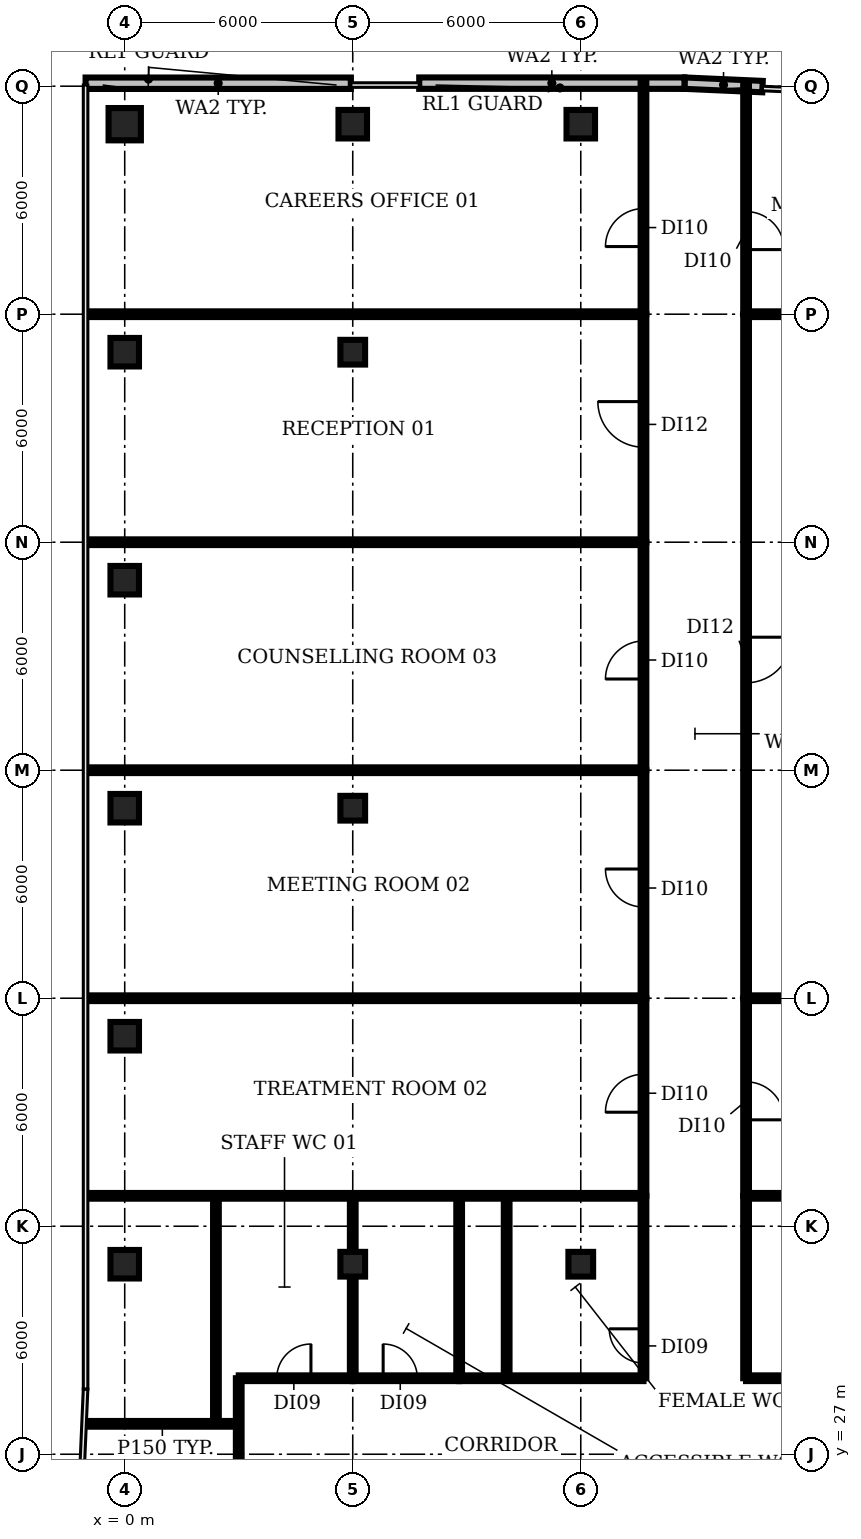
"""IFC4 building model, lengths in metres.
Left out: names, types, materials, properties, quantities, classifications, styles, units other than length and angle.
Written with IfcOpenShell. Run it as: python <this file> out.ifc"""

import sys

from ifc_helpers import new_model, si_unit, direction, frame, frame_2d, origin, origin_2d, place, context, subcontext, project, spatial, rectangle, circle, extrude, element, fill, save


model = new_model("IFC4")
c1 = context("Model", 3, precision=1e-05, world=origin(), true_north=direction((0.0, 1.0)))
c2 = subcontext(c1, "Body", "Model", "MODEL_VIEW")
j1 = project(units=[si_unit("LENGTHUNIT", "METRE"), si_unit("PLANEANGLEUNIT", "RADIAN")], contexts=[c1])
p1 = place(None, origin())
s1 = spatial("IfcSite", under=j1, at=p1, CompositionType="ELEMENT")
p2 = place(p1, origin())
s2 = spatial("IfcBuilding", under=s1, at=p2, CompositionType="ELEMENT")
p3 = place(p2, frame((0.0, 0.0, 276.8)))
s3 = spatial("IfcBuildingStorey", under=s2, at=p3, CompositionType="ELEMENT", Elevation=276.8)
for number, where, z_axis, x_axis in (
    (1, (0.0, 32.0, 0.0), (0.0, 0.0, 1.0), (1.0, 0.0, 0.0)),
    (2, (0.0, 38.0, 0.0), (0.0, 0.0, 1.0), (1.0, 0.0, 0.0)),
    (3, (0.0, 44.0, 0.0), (0.0, 0.0, 1.0), (1.0, 0.0, 0.0)),
    (4, (0.0, 50.0, 0.0), (0.0, 0.0, 1.0), (1.0, 0.0, 0.0)),
    (5, (0.0, 56.0, 0.0), (0.0, 0.0, 1.0), (1.0, 0.0, 0.0)),
):
    element("IfcColumn", number, at=place(p3, frame(where, z_axis=z_axis, x_axis=x_axis)), inside=s3, PredefinedType="COLUMN", context=c2, shape_type="SweptSolid", body=[
        extrude(rectangle(XDim=0.75, YDim=0.75, at=origin_2d()), origin(), (0.0, 0.0, 1.0), 3.85),
    ])
p4 = place(p3, frame((0.0, 62.0, 0.0), z_axis=(0.0, 0.0, 1.0), x_axis=(1.0, 0.0, 0.0)))
e6 = element("IfcColumn", 6, at=p4, inside=s3, PredefinedType="COLUMN", context=c2, shape_type="SweptSolid", body=[
    extrude(circle(Radius=0.425, at=origin_2d()), origin(), (0.0, 0.0, 1.0), 3.85),
])
for number, where, z_axis, x_axis in (
    (7, (6.0, 32.0, 0.0), (0.0, 0.0, 1.0), (1.0, 0.0, 0.0)),
    (8, (6.0, 44.0, 0.0), (0.0, 0.0, 1.0), (1.0, 0.0, 0.0)),
    (9, (6.0, 56.0, 0.0), (0.0, 0.0, 1.0), (1.0, 0.0, 0.0)),
):
    element("IfcColumn", number, at=place(p3, frame(where, z_axis=z_axis, x_axis=x_axis)), inside=s3, PredefinedType="COLUMN", context=c2, shape_type="SweptSolid", body=[
        extrude(rectangle(XDim=0.65, YDim=0.65, at=origin_2d()), origin(), (0.0, 0.0, 1.0), 3.85),
    ])
p5 = place(p3, frame((6.0, 62.0, 0.0), z_axis=(0.0, 0.0, 1.0), x_axis=(1.0, 0.0, 0.0)))
e10 = element("IfcColumn", 10, at=p5, inside=s3, PredefinedType="COLUMN", context=c2, shape_type="SweptSolid", body=[
    extrude(rectangle(XDim=0.75, YDim=0.75, at=origin_2d()), origin(), (0.0, 0.0, 1.0), 3.85),
])
p6 = place(p3, frame((12.0, 32.0, 0.0), z_axis=(0.0, 0.0, 1.0), x_axis=(1.0, 0.0, 0.0)))
e11 = element("IfcColumn", 11, at=p6, inside=s3, PredefinedType="COLUMN", context=c2, shape_type="SweptSolid", body=[
    extrude(rectangle(XDim=0.65, YDim=0.65, at=origin_2d()), origin(), (0.0, 0.0, 1.0), 3.85),
])
p7 = place(p3, frame((12.0, 62.0, 0.0), z_axis=(0.0, 0.0, 1.0), x_axis=(1.0, 0.0, 0.0)))
e12 = element("IfcColumn", 12, at=p7, inside=s3, PredefinedType="COLUMN", context=c2, shape_type="SweptSolid", body=[
    extrude(rectangle(XDim=0.75, YDim=0.75, at=origin_2d()), origin(), (0.0, 0.0, 1.0), 3.85),
])
p8 = place(p3, frame((16.782, 62.989, 0.0), z_axis=(0.0, 0.0, 1.0), x_axis=(-0.999021060555, 0.044237094932, 0.0)))
e13 = element("IfcWall", 13, at=p8, inside=s3, PredefinedType="SOLIDWALL", context=c2, shape_type="SweptSolid", body=[
    extrude(rectangle(XDim=2.053, YDim=0.3, at=frame_2d((1.026, 0.0))), origin(), (0.0, 0.0, 1.0), 3.85),
])
for number, where, z_axis, x_axis in (
    (14, (14.729, 63.08, 0.0), (0.0, 0.0, 1.0), (-1.0, 0.0, 0.0)),
    (15, (5.949, 63.078, 0.0), (0.0, 0.0, 1.0), (-1.0, 0.0, 0.0)),
):
    element("IfcWall", number, at=place(p3, frame(where, z_axis=z_axis, x_axis=x_axis)), inside=s3, PredefinedType="SOLIDWALL", context=c2, shape_type="SweptSolid", body=[
        extrude(rectangle(XDim=6.979, YDim=0.3, at=frame_2d((3.49, 0.0))), origin(), (0.0, 0.0, 1.0), 3.85),
    ])
p9 = place(p3, frame((-1.02, 27.8, 0.0), z_axis=(0.0, 0.0, 1.0), x_axis=(1.0, 0.0, 0.0)))
e16 = element("IfcWall", 16, at=p9, inside=s3, PredefinedType="PARTITIONING", context=c2, shape_type="SweptSolid", body=[
    extrude(rectangle(XDim=4.02, YDim=0.15, at=frame_2d((2.01, 0.0))), origin(), (0.0, 0.0, 1.0), 2.9),
])
for number, where, z_axis, x_axis in (
    (17, (-0.98, 33.8, 0.0), (0.0, 0.0, 1.0), (1.0, 0.0, 0.0)),
    (18, (-0.98, 39.0, 0.0), (0.0, 0.0, 1.0), (1.0, 0.0, 0.0)),
    (19, (-0.98, 45.0, 0.0), (0.0, 0.0, 1.0), (1.0, 0.0, 0.0)),
    (20, (-0.98, 51.0, 0.0), (0.0, 0.0, 1.0), (1.0, 0.0, 0.0)),
    (21, (-0.98, 57.0, 0.0), (0.0, 0.0, 1.0), (1.0, 0.0, 0.0)),
):
    element("IfcWall", number, at=place(p3, frame(where, z_axis=z_axis, x_axis=x_axis)), inside=s3, PredefinedType="PARTITIONING", context=c2, shape_type="SweptSolid", body=[
        extrude(rectangle(XDim=14.63, YDim=0.15, at=frame_2d((7.315, 0.0))), origin(), (0.0, 0.0, 1.0), 2.9),
    ])
p10 = place(p3, frame((2.4, 27.8, 0.0), z_axis=(0.0, 0.0, 1.0), x_axis=(0.0, 1.0, 0.0)))
e22 = element("IfcWall", 22, at=p10, inside=s3, PredefinedType="PARTITIONING", context=c2, shape_type="SweptSolid", body=[
    extrude(rectangle(XDim=6.0, YDim=0.15, at=frame_2d((3.0, 0.0))), origin(), (0.0, 0.0, 1.0), 2.9),
])
p11 = place(p3, frame((3.0, 25.1, 0.0), z_axis=(0.0, 0.0, 1.0), x_axis=(0.0, 1.0, 0.0)))
e23 = element("IfcWall", 23, at=p11, inside=s3, PredefinedType="PARTITIONING", context=c2, shape_type="SweptSolid", body=[
    extrude(rectangle(XDim=3.9, YDim=0.15, at=frame_2d((1.95, 0.0))), origin(), (0.0, 0.0, 1.0), 2.9),
])
p12 = place(p3, frame((3.0, 29.0, 0.0), z_axis=(0.0, 0.0, 1.0), x_axis=(1.0, 0.0, 0.0)))
e24 = element("IfcWall", 24, at=p12, inside=s3, PredefinedType="PARTITIONING", context=c2, shape_type="SweptSolid", body=[
    extrude(rectangle(XDim=3.0, YDim=0.15, at=frame_2d((1.5, 0.0))), origin(), (0.0, 0.0, 1.0), 2.9),
])
p13 = place(p12, frame((1.0, 0.0, 0.0)))
e25 = element("IfcOpeningElement", 25, at=p13, cuts=e24, PredefinedType="OPENING", context=c2, shape_type="SweptSolid", body=[
    extrude(rectangle(XDim=0.9, YDim=2.1, at=frame_2d((0.45, 1.05))), frame((0.0, 0.085, 0.0), z_axis=(0.0, -1.0, 0.0), x_axis=(1.0, 0.0, 0.0)), (0.0, 0.0, 1.0), 0.17),
])
p14 = place(p3, frame((6.0, 29.0, 0.0), z_axis=(0.0, 0.0, 1.0), x_axis=(0.0, 1.0, 0.0)))
e26 = element("IfcWall", 26, at=p14, inside=s3, PredefinedType="PARTITIONING", context=c2, shape_type="SweptSolid", body=[
    extrude(rectangle(XDim=4.8, YDim=0.15, at=frame_2d((2.4, 0.0))), origin(), (0.0, 0.0, 1.0), 2.9),
])
p15 = place(p3, frame((6.0, 29.0, 0.0), z_axis=(0.0, 0.0, 1.0), x_axis=(1.0, 0.0, 0.0)))
e27 = element("IfcWall", 27, at=p15, inside=s3, PredefinedType="PARTITIONING", context=c2, shape_type="SweptSolid", body=[
    extrude(rectangle(XDim=2.8, YDim=0.15, at=frame_2d((1.4, 0.0))), origin(), (0.0, 0.0, 1.0), 2.9),
])
p16 = place(p15, frame((0.8, 0.0, 0.0)))
e28 = element("IfcOpeningElement", 28, at=p16, cuts=e27, PredefinedType="OPENING", context=c2, shape_type="SweptSolid", body=[
    extrude(rectangle(XDim=0.9, YDim=2.1, at=frame_2d((0.45, 1.05))), frame((0.0, 0.085, 0.0), z_axis=(0.0, -1.0, 0.0), x_axis=(1.0, 0.0, 0.0)), (0.0, 0.0, 1.0), 0.17),
])
p17 = place(p3, frame((8.8, 29.0, 0.0), z_axis=(0.0, 0.0, 1.0), x_axis=(0.0, 1.0, 0.0)))
e29 = element("IfcWall", 29, at=p17, inside=s3, PredefinedType="PARTITIONING", context=c2, shape_type="SweptSolid", body=[
    extrude(rectangle(XDim=4.8, YDim=0.15, at=frame_2d((2.4, 0.0))), origin(), (0.0, 0.0, 1.0), 2.9),
])
p18 = place(p3, frame((8.8, 29.0, 0.0), z_axis=(0.0, 0.0, 1.0), x_axis=(1.0, 0.0, 0.0)))
e30 = element("IfcWall", 30, at=p18, inside=s3, PredefinedType="PARTITIONING", context=c2, shape_type="SweptSolid", body=[
    extrude(rectangle(XDim=4.85, YDim=0.15, at=frame_2d((2.425, 0.0))), origin(), (0.0, 0.0, 1.0), 2.9),
])
p19 = place(p3, frame((10.05, 29.0, 0.0), z_axis=(0.0, 0.0, 1.0), x_axis=(0.0, 1.0, 0.0)))
e31 = element("IfcWall", 31, at=p19, inside=s3, PredefinedType="PARTITIONING", context=c2, shape_type="SweptSolid", body=[
    extrude(rectangle(XDim=4.8, YDim=0.15, at=frame_2d((2.4, 0.0))), origin(), (0.0, 0.0, 1.0), 2.9),
])
p20 = place(p3, frame((13.65, 29.0, 0.0), z_axis=(0.0, 0.0, 1.0), x_axis=(0.0, 1.0, 0.0)))
e32 = element("IfcWall", 32, at=p20, inside=s3, PredefinedType="PARTITIONING", context=c2, shape_type="SweptSolid", body=[
    extrude(rectangle(XDim=4.8, YDim=0.15, at=frame_2d((2.4, 0.0))), origin(), (0.0, 0.0, 1.0), 2.9),
])
p21 = place(p20, frame((0.4, 0.0, 0.0)))
e33 = element("IfcOpeningElement", 33, at=p21, cuts=e32, PredefinedType="OPENING", context=c2, shape_type="SweptSolid", body=[
    extrude(rectangle(XDim=0.9, YDim=2.1, at=frame_2d((0.45, 1.05))), frame((0.0, 0.085, 0.0), z_axis=(0.0, -1.0, 0.0), x_axis=(1.0, 0.0, 0.0)), (0.0, 0.0, 1.0), 0.17),
])
p22 = place(p3, frame((13.65, 33.8, 0.0), z_axis=(0.0, 0.0, 1.0), x_axis=(0.0, 1.0, 0.0)))
e34 = element("IfcWall", 34, at=p22, inside=s3, PredefinedType="PARTITIONING", context=c2, shape_type="SweptSolid", body=[
    extrude(rectangle(XDim=5.2, YDim=0.15, at=frame_2d((2.6, 0.0))), origin(), (0.0, 0.0, 1.0), 2.9),
])
p23 = place(p22, frame((2.2, 0.0, 0.0)))
e35 = element("IfcOpeningElement", 35, at=p23, cuts=e34, PredefinedType="OPENING", context=c2, shape_type="SweptSolid", body=[
    extrude(rectangle(XDim=1.0, YDim=2.1, at=frame_2d((0.5, 1.05))), frame((0.0, 0.085, 0.0), z_axis=(0.0, -1.0, 0.0), x_axis=(1.0, 0.0, 0.0)), (0.0, 0.0, 1.0), 0.17),
])
p24 = place(p3, frame((13.65, 39.0, 0.0), z_axis=(0.0, 0.0, 1.0), x_axis=(0.0, 1.0, 0.0)))
e36 = element("IfcWall", 36, at=p24, inside=s3, PredefinedType="PARTITIONING", context=c2, shape_type="SweptSolid", body=[
    extrude(rectangle(XDim=6.0, YDim=0.15, at=frame_2d((3.0, 0.0))), origin(), (0.0, 0.0, 1.0), 2.9),
])
p25 = place(p24, frame((2.4, 0.0, 0.0)))
e37 = element("IfcOpeningElement", 37, at=p25, cuts=e36, PredefinedType="OPENING", context=c2, shape_type="SweptSolid", body=[
    extrude(rectangle(XDim=1.0, YDim=2.1, at=frame_2d((0.5, 1.05))), frame((0.0, 0.085, 0.0), z_axis=(0.0, -1.0, 0.0), x_axis=(1.0, 0.0, 0.0)), (0.0, 0.0, 1.0), 0.17),
])
p26 = place(p3, frame((13.65, 45.0, 0.0), z_axis=(0.0, 0.0, 1.0), x_axis=(0.0, 1.0, 0.0)))
e38 = element("IfcWall", 38, at=p26, inside=s3, PredefinedType="PARTITIONING", context=c2, shape_type="SweptSolid", body=[
    extrude(rectangle(XDim=6.0, YDim=0.15, at=frame_2d((3.0, 0.0))), origin(), (0.0, 0.0, 1.0), 2.9),
])
p27 = place(p26, frame((2.4, 0.0, 0.0)))
e39 = element("IfcOpeningElement", 39, at=p27, cuts=e38, PredefinedType="OPENING", context=c2, shape_type="SweptSolid", body=[
    extrude(rectangle(XDim=1.0, YDim=2.1, at=frame_2d((0.5, 1.05))), frame((0.0, 0.085, 0.0), z_axis=(0.0, -1.0, 0.0), x_axis=(1.0, 0.0, 0.0)), (0.0, 0.0, 1.0), 0.17),
])
p28 = place(p3, frame((13.65, 51.0, 0.0), z_axis=(0.0, 0.0, 1.0), x_axis=(0.0, 1.0, 0.0)))
e40 = element("IfcWall", 40, at=p28, inside=s3, PredefinedType="PARTITIONING", context=c2, shape_type="SweptSolid", body=[
    extrude(rectangle(XDim=6.0, YDim=0.15, at=frame_2d((3.0, 0.0))), origin(), (0.0, 0.0, 1.0), 2.9),
])
p29 = place(p28, frame((2.5, 0.0, 0.0)))
e41 = element("IfcOpeningElement", 41, at=p29, cuts=e40, PredefinedType="OPENING", context=c2, shape_type="SweptSolid", body=[
    extrude(rectangle(XDim=1.2, YDim=2.1, at=frame_2d((0.6, 1.05))), frame((0.0, 0.085, 0.0), z_axis=(0.0, -1.0, 0.0), x_axis=(1.0, 0.0, 0.0)), (0.0, 0.0, 1.0), 0.17),
])
p30 = place(p3, frame((13.65, 57.0, 0.0), z_axis=(0.0, 0.0, 1.0), x_axis=(0.0, 1.0, 0.0)))
e42 = element("IfcWall", 42, at=p30, inside=s3, PredefinedType="PARTITIONING", context=c2, shape_type="SweptSolid", body=[
    extrude(rectangle(XDim=6.09, YDim=0.15, at=frame_2d((3.045, 0.0))), origin(), (0.0, 0.0, 1.0), 2.9),
])
p31 = place(p30, frame((1.78, 0.0, 0.0)))
e43 = element("IfcOpeningElement", 43, at=p31, cuts=e42, PredefinedType="OPENING", context=c2, shape_type="SweptSolid", body=[
    extrude(rectangle(XDim=1.0, YDim=2.1, at=frame_2d((0.5, 1.05))), frame((0.0, 0.085, 0.0), z_axis=(0.0, -1.0, 0.0), x_axis=(1.0, 0.0, 0.0)), (0.0, 0.0, 1.0), 0.17),
])
p32 = place(p3, frame((16.35, 29.0, 0.0), z_axis=(0.0, 0.0, 1.0), x_axis=(0.0, 1.0, 0.0)))
e44 = element("IfcWall", 44, at=p32, inside=s3, PredefinedType="PARTITIONING", context=c2, shape_type="SweptSolid", body=[
    extrude(rectangle(XDim=4.8, YDim=0.15, at=frame_2d((2.4, 0.0))), origin(), (0.0, 0.0, 1.0), 2.9),
])
p33 = place(p3, frame((16.35, 29.0, 0.0), z_axis=(0.0, 0.0, 1.0), x_axis=(1.0, 0.0, 0.0)))
e45 = element("IfcWall", 45, at=p33, inside=s3, PredefinedType="PARTITIONING", context=c2, shape_type="SweptSolid", body=[
    extrude(rectangle(XDim=5.28, YDim=0.15, at=frame_2d((2.64, 0.0))), origin(), (0.0, 0.0, 1.0), 2.9),
])
p34 = place(p3, frame((16.35, 33.8, 0.0), z_axis=(0.0, 0.0, 1.0), x_axis=(1.0, 0.0, 0.0)))
e46 = element("IfcWall", 46, at=p34, inside=s3, PredefinedType="PARTITIONING", context=c2, shape_type="SweptSolid", body=[
    extrude(rectangle(XDim=8.865, YDim=0.15, at=frame_2d((4.433, 0.0))), origin(), (0.0, 0.0, 1.0), 2.9),
])
p35 = place(p3, frame((16.35, 39.0, 0.0), z_axis=(0.0, 0.0, 1.0), x_axis=(0.0, -1.0, 0.0)))
e47 = element("IfcWall", 47, at=p35, inside=s3, PredefinedType="PARTITIONING", context=c2, shape_type="SweptSolid", body=[
    extrude(rectangle(XDim=5.2, YDim=0.15, at=frame_2d((2.6, 0.0))), origin(), (0.0, 0.0, 1.0), 2.9),
])
p36 = place(p35, frame((2.2, 0.0, 0.0)))
e48 = element("IfcOpeningElement", 48, at=p36, cuts=e47, PredefinedType="OPENING", context=c2, shape_type="SweptSolid", body=[
    extrude(rectangle(XDim=1.0, YDim=2.1, at=frame_2d((0.5, 1.05))), frame((0.0, 0.085, 0.0), z_axis=(0.0, -1.0, 0.0), x_axis=(1.0, 0.0, 0.0)), (0.0, 0.0, 1.0), 0.17),
])
p37 = place(p3, frame((16.35, 39.0, 0.0), z_axis=(0.0, 0.0, 1.0), x_axis=(1.0, 0.0, 0.0)))
e49 = element("IfcWall", 49, at=p37, inside=s3, PredefinedType="PARTITIONING", context=c2, shape_type="SweptSolid", body=[
    extrude(rectangle(XDim=9.1, YDim=0.15, at=frame_2d((4.55, 0.0))), origin(), (0.0, 0.0, 1.0), 2.9),
])
p38 = place(p3, frame((16.35, 57.0, 0.0), z_axis=(0.0, 0.0, 1.0), x_axis=(0.0, -1.0, 0.0)))
e50 = element("IfcWall", 50, at=p38, inside=s3, PredefinedType="PARTITIONING", context=c2, shape_type="SweptSolid", body=[
    extrude(rectangle(XDim=18.0, YDim=0.15, at=frame_2d((9.0, 0.0))), origin(), (0.0, 0.0, 1.0), 2.9),
])
p39 = place(p38, frame((8.5, 0.0, 0.0)))
e51 = element("IfcOpeningElement", 51, at=p39, cuts=e50, PredefinedType="OPENING", context=c2, shape_type="SweptSolid", body=[
    extrude(rectangle(XDim=1.2, YDim=2.1, at=frame_2d((0.6, 1.05))), frame((0.0, 0.085, 0.0), z_axis=(0.0, -1.0, 0.0), x_axis=(1.0, 0.0, 0.0)), (0.0, 0.0, 1.0), 0.17),
])
p40 = place(p3, frame((16.35, 57.0, 0.0), z_axis=(0.0, 0.0, 1.0), x_axis=(1.0, 0.0, 0.0)))
e52 = element("IfcWall", 52, at=p40, inside=s3, PredefinedType="PARTITIONING", context=c2, shape_type="SweptSolid", body=[
    extrude(rectangle(XDim=9.89, YDim=0.15, at=frame_2d((4.945, 0.0))), origin(), (0.0, 0.0, 1.0), 2.9),
])
p41 = place(p3, frame((16.35, 63.018, 0.0), z_axis=(0.0, 0.0, 1.0), x_axis=(0.0, -1.0, 0.0)))
e53 = element("IfcWall", 53, at=p41, inside=s3, PredefinedType="PARTITIONING", context=c2, shape_type="SweptSolid", body=[
    extrude(rectangle(XDim=6.018, YDim=0.15, at=frame_2d((3.009, 0.0))), origin(), (0.0, 0.0, 1.0), 2.9),
])
p42 = place(p41, frame((3.318, 0.0, 0.0)))
e54 = element("IfcOpeningElement", 54, at=p42, cuts=e53, PredefinedType="OPENING", context=c2, shape_type="SweptSolid", body=[
    extrude(rectangle(XDim=1.0, YDim=2.1, at=frame_2d((0.5, 1.05))), frame((0.0, 0.085, 0.0), z_axis=(0.0, -1.0, 0.0), x_axis=(1.0, 0.0, 0.0)), (0.0, 0.0, 1.0), 0.17),
])
p43 = place(p13, origin())
e55 = element("IfcDoor", 55, at=p43, inside=s3, OperationType="SINGLE_SWING_RIGHT", PredefinedType="DOOR", context=c2, shape_type="SweptSolid", body=[
    extrude(rectangle(XDim=0.9, YDim=2.1, at=frame_2d((0.45, 1.05))), frame((0.0, 0.025, 0.0), z_axis=(0.0, -1.0, 0.0), x_axis=(1.0, 0.0, 0.0)), (0.0, 0.0, 1.0), 0.05),
])
fill(e25, e55)
p44 = place(p16, origin())
e56 = element("IfcDoor", 56, at=p44, inside=s3, OperationType="SINGLE_SWING_LEFT", PredefinedType="DOOR", context=c2, shape_type="SweptSolid", body=[
    extrude(rectangle(XDim=0.9, YDim=2.1, at=frame_2d((0.45, 1.05))), frame((0.0, 0.025, 0.0), z_axis=(0.0, -1.0, 0.0), x_axis=(1.0, 0.0, 0.0)), (0.0, 0.0, 1.0), 0.05),
])
fill(e28, e56)
p45 = place(p21, origin())
e57 = element("IfcDoor", 57, at=p45, inside=s3, OperationType="SINGLE_SWING_RIGHT", PredefinedType="DOOR", context=c2, shape_type="SweptSolid", body=[
    extrude(rectangle(XDim=0.9, YDim=2.1, at=frame_2d((0.45, 1.05))), frame((0.0, 0.025, 0.0), z_axis=(0.0, -1.0, 0.0), x_axis=(1.0, 0.0, 0.0)), (0.0, 0.0, 1.0), 0.05),
])
fill(e33, e57)
p46 = place(p23, origin())
e58 = element("IfcDoor", 58, at=p46, inside=s3, OperationType="SINGLE_SWING_LEFT", PredefinedType="DOOR", context=c2, shape_type="SweptSolid", body=[
    extrude(rectangle(XDim=1.0, YDim=2.1, at=frame_2d((0.5, 1.05))), frame((0.0, 0.025, 0.0), z_axis=(0.0, -1.0, 0.0), x_axis=(1.0, 0.0, 0.0)), (0.0, 0.0, 1.0), 0.05),
])
fill(e35, e58)
p47 = place(p25, origin())
e59 = element("IfcDoor", 59, at=p47, inside=s3, OperationType="SINGLE_SWING_RIGHT", PredefinedType="DOOR", context=c2, shape_type="SweptSolid", body=[
    extrude(rectangle(XDim=1.0, YDim=2.1, at=frame_2d((0.5, 1.05))), frame((0.0, 0.025, 0.0), z_axis=(0.0, -1.0, 0.0), x_axis=(1.0, 0.0, 0.0)), (0.0, 0.0, 1.0), 0.05),
])
fill(e37, e59)
p48 = place(p27, origin())
e60 = element("IfcDoor", 60, at=p48, inside=s3, OperationType="SINGLE_SWING_LEFT", PredefinedType="DOOR", context=c2, shape_type="SweptSolid", body=[
    extrude(rectangle(XDim=1.0, YDim=2.1, at=frame_2d((0.5, 1.05))), frame((0.0, 0.025, 0.0), z_axis=(0.0, -1.0, 0.0), x_axis=(1.0, 0.0, 0.0)), (0.0, 0.0, 1.0), 0.05),
])
fill(e39, e60)
p49 = place(p29, origin())
e61 = element("IfcDoor", 61, at=p49, inside=s3, OperationType="SINGLE_SWING_RIGHT", PredefinedType="DOOR", context=c2, shape_type="SweptSolid", body=[
    extrude(rectangle(XDim=1.2, YDim=2.1, at=frame_2d((0.6, 1.05))), frame((0.0, 0.025, 0.0), z_axis=(0.0, -1.0, 0.0), x_axis=(1.0, 0.0, 0.0)), (0.0, 0.0, 1.0), 0.05),
])
fill(e41, e61)
p50 = place(p31, origin())
e62 = element("IfcDoor", 62, at=p50, inside=s3, OperationType="SINGLE_SWING_LEFT", PredefinedType="DOOR", context=c2, shape_type="SweptSolid", body=[
    extrude(rectangle(XDim=1.0, YDim=2.1, at=frame_2d((0.5, 1.05))), frame((0.0, 0.025, 0.0), z_axis=(0.0, -1.0, 0.0), x_axis=(1.0, 0.0, 0.0)), (0.0, 0.0, 1.0), 0.05),
])
fill(e43, e62)
p51 = place(p36, origin())
e63 = element("IfcDoor", 63, at=p51, inside=s3, OperationType="SINGLE_SWING_RIGHT", PredefinedType="DOOR", context=c2, shape_type="SweptSolid", body=[
    extrude(rectangle(XDim=1.0, YDim=2.1, at=frame_2d((0.5, 1.05))), frame((0.0, 0.025, 0.0), z_axis=(0.0, -1.0, 0.0), x_axis=(1.0, 0.0, 0.0)), (0.0, 0.0, 1.0), 0.05),
])
fill(e48, e63)
p52 = place(p39, origin())
e64 = element("IfcDoor", 64, at=p52, inside=s3, OperationType="SINGLE_SWING_LEFT", PredefinedType="DOOR", context=c2, shape_type="SweptSolid", body=[
    extrude(rectangle(XDim=1.2, YDim=2.1, at=frame_2d((0.6, 1.05))), frame((0.0, 0.025, 0.0), z_axis=(0.0, -1.0, 0.0), x_axis=(1.0, 0.0, 0.0)), (0.0, 0.0, 1.0), 0.05),
])
fill(e51, e64)
p53 = place(p42, origin())
e65 = element("IfcDoor", 65, at=p53, inside=s3, OperationType="SINGLE_SWING_RIGHT", PredefinedType="DOOR", context=c2, shape_type="SweptSolid", body=[
    extrude(rectangle(XDim=1.0, YDim=2.1, at=frame_2d((0.5, 1.05))), frame((0.0, 0.025, 0.0), z_axis=(0.0, -1.0, 0.0), x_axis=(1.0, 0.0, 0.0)), (0.0, 0.0, 1.0), 0.05),
])
fill(e54, e65)
save(model, sys.argv[1])
